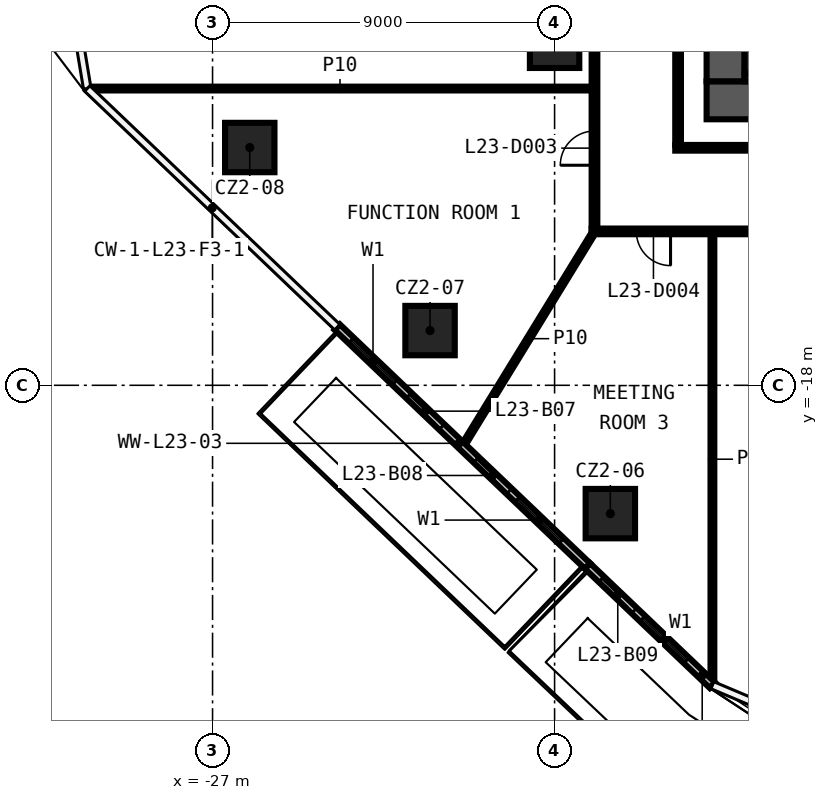
"""IFC4 building model, lengths in metres.
Left out: names, types, materials, properties, quantities, classifications, styles, units other than length and angle.
Written with IfcOpenShell. Run it as: python <this file> out.ifc"""

import sys

from ifc_helpers import new_model, si_unit, direction, frame, frame_2d, origin, origin_2d, place, context, subcontext, project, spatial, rectangle, extrude, element, fill, save


model = new_model("IFC4")
c1 = context("Model", 3, precision=1e-05, world=origin(), true_north=direction((0.0, 1.0)))
c2 = subcontext(c1, "Body", "Model", "MODEL_VIEW")
j1 = project(units=[si_unit("LENGTHUNIT", "METRE"), si_unit("PLANEANGLEUNIT", "RADIAN")], contexts=[c1])
p1 = place(None, origin())
s1 = spatial("IfcSite", under=j1, at=p1, CompositionType="ELEMENT")
p2 = place(p1, origin())
s2 = spatial("IfcBuilding", under=s1, at=p2, CompositionType="ELEMENT")
p3 = place(p2, frame((0.0, 0.0, 110.0)))
s3 = spatial("IfcBuildingStorey", under=s2, at=p3, CompositionType="ELEMENT", Elevation=110.0)
for number, where, z_axis, x_axis in (
    (1, (-16.533, -21.377, 0.0), (0.0, 0.0, 1.0), (1.0, 0.0, 0.0)),
    (2, (-21.277, -16.56, 0.0), (0.0, 0.0, 1.0), (1.0, 0.0, 0.0)),
    (3, (-26.021, -11.743, 0.0), (0.0, 0.0, 1.0), (1.0, 0.0, 0.0)),
    (4, (-18.0, -9.0, 0.0), (0.0, 0.0, 1.0), (1.0, 0.0, 0.0)),
):
    element("IfcColumn", number, at=place(p3, frame(where, z_axis=z_axis, x_axis=x_axis)), inside=s3, PredefinedType="COLUMN", context=c2, shape_type="SweptSolid", body=[
        extrude(rectangle(XDim=1.3, YDim=1.3, at=origin_2d()), origin(), (0.0, 0.0, 1.0), 3.3),
    ])
p4 = place(p3, frame((17.025, -13.95, 0.0), z_axis=(0.0, 0.0, 1.0), x_axis=(-1.0, 0.0, 0.0)))
e5 = element("IfcWall", 5, at=p4, inside=s3, PredefinedType="PARTITIONING", context=c2, shape_type="SweptSolid", body=[
    extrude(rectangle(XDim=34.05, YDim=0.15, at=frame_2d((17.025, 0.0))), origin(), (0.0, 0.0, 1.0), 3.3),
])
p5 = place(p4, frame((31.974, 0.0, 0.0)))
e6 = element("IfcOpeningElement", 6, at=p5, cuts=e5, PredefinedType="OPENING", context=c2, shape_type="SweptSolid", body=[
    extrude(rectangle(XDim=0.9, YDim=2.1, at=frame_2d((0.45, 1.05))), frame((0.0, 0.085, 0.0), z_axis=(0.0, -1.0, 0.0), x_axis=(1.0, 0.0, 0.0)), (0.0, 0.0, 1.0), 0.17),
])
p6 = place(p4, frame((27.543, 0.0, 0.0)))
e7 = element("IfcOpeningElement", 7, at=p6, cuts=e5, PredefinedType="OPENING", context=c2, shape_type="SweptSolid", body=[
    extrude(rectangle(XDim=1.0, YDim=2.1, at=frame_2d((0.5, 1.05))), frame((0.0, 0.085, 0.0), z_axis=(0.0, -1.0, 0.0), x_axis=(1.0, 0.0, 0.0)), (0.0, 0.0, 1.0), 0.17),
])
p7 = place(p4, frame((16.333, 0.0, 0.0)))
e8 = element("IfcOpeningElement", 8, at=p7, cuts=e5, PredefinedType="OPENING", context=c2, shape_type="SweptSolid", body=[
    extrude(rectangle(XDim=1.0, YDim=2.1, at=frame_2d((0.5, 1.05))), frame((0.0, 0.085, 0.0), z_axis=(0.0, -1.0, 0.0), x_axis=(1.0, 0.0, 0.0)), (0.0, 0.0, 1.0), 0.17),
])
p8 = place(p4, frame((12.006, 0.0, 0.0)))
e9 = element("IfcOpeningElement", 9, at=p8, cuts=e5, PredefinedType="OPENING", context=c2, shape_type="SweptSolid", body=[
    extrude(rectangle(XDim=1.0, YDim=2.1, at=frame_2d((0.5, 1.05))), frame((0.0, 0.085, 0.0), z_axis=(0.0, -1.0, 0.0), x_axis=(1.0, 0.0, 0.0)), (0.0, 0.0, 1.0), 0.17),
])
p9 = place(p4, frame((5.124, 0.0, 0.0)))
e10 = element("IfcOpeningElement", 10, at=p9, cuts=e5, PredefinedType="OPENING", context=c2, shape_type="SweptSolid", body=[
    extrude(rectangle(XDim=1.0, YDim=2.1, at=frame_2d((0.5, 1.05))), frame((0.0, 0.085, 0.0), z_axis=(0.0, -1.0, 0.0), x_axis=(1.0, 0.0, 0.0)), (0.0, 0.0, 1.0), 0.17),
])
p10 = place(p4, frame((3.144, 0.0, 0.0)))
e11 = element("IfcOpeningElement", 11, at=p10, cuts=e5, PredefinedType="OPENING", context=c2, shape_type="SweptSolid", body=[
    extrude(rectangle(XDim=1.0, YDim=2.1, at=frame_2d((0.5, 1.05))), frame((0.0, 0.085, 0.0), z_axis=(0.0, -1.0, 0.0), x_axis=(1.0, 0.0, 0.0)), (0.0, 0.0, 1.0), 0.17),
])
p11 = place(p3, frame((-14.825, -11.75, 0.0), z_axis=(0.0, 0.0, 1.0), x_axis=(1.0, 0.0, 0.0)))
e12 = element("IfcWall", 12, at=p11, inside=s3, PredefinedType="PARTITIONING", context=c2, shape_type="SweptSolid", body=[
    extrude(rectangle(XDim=22.025, YDim=0.15, at=frame_2d((11.012, 0.0))), origin(), (0.0, 0.0, 1.0), 3.3),
])
p12 = place(p3, frame((-30.268, -10.191, 0.0), z_axis=(0.0, 0.0, 1.0), x_axis=(1.0, 0.0, 0.0)))
e13 = element("IfcWall", 13, at=p12, inside=s3, PredefinedType="PARTITIONING", context=c2, shape_type="SweptSolid", body=[
    extrude(rectangle(XDim=13.243, YDim=0.1, at=frame_2d((6.622, 0.0))), origin(), (0.0, 0.0, 1.0), 3.3),
])
p13 = place(p3, frame((-20.415, -19.596, 0.0), z_axis=(0.0, 0.0, 1.0), x_axis=(0.5230874117, 0.85227903865, 0.0)))
e14 = element("IfcWall", 14, at=p13, inside=s3, PredefinedType="PARTITIONING", context=c2, shape_type="SweptSolid", body=[
    extrude(rectangle(XDim=6.624, YDim=0.1, at=frame_2d((3.312, 0.0))), origin(), (0.0, 0.0, 1.0), 3.3),
])
p14 = place(p3, frame((-13.847, -25.865, 0.0), z_axis=(0.0, 0.0, 1.0), x_axis=(0.0, 1.0, 0.0)))
e15 = element("IfcWall", 15, at=p14, inside=s3, PredefinedType="PARTITIONING", context=c2, shape_type="SweptSolid", body=[
    extrude(rectangle(XDim=11.84, YDim=0.1, at=frame_2d((5.92, 0.0))), origin(), (0.0, 0.0, 1.0), 3.3),
])
p15 = place(p3, frame((-14.75, 11.675, 0.0), z_axis=(0.0, 0.0, 1.0), x_axis=(0.0, -1.0, 0.0)))
e16 = element("IfcWall", 16, at=p15, inside=s3, PredefinedType="PARTITIONING", context=c2, shape_type="SweptSolid", body=[
    extrude(rectangle(XDim=23.35, YDim=0.15, at=frame_2d((11.675, 0.0))), origin(), (0.0, 0.0, 1.0), 3.3),
])
p16 = place(p15, frame((11.225, 0.0, 0.0)))
e17 = element("IfcOpeningElement", 17, at=p16, cuts=e16, PredefinedType="OPENING", context=c2, shape_type="SweptSolid", body=[
    extrude(rectangle(XDim=0.9, YDim=2.1, at=frame_2d((0.45, 1.05))), frame((0.0, 0.085, 0.0), z_axis=(0.0, -1.0, 0.0), x_axis=(1.0, 0.0, 0.0)), (0.0, 0.0, 1.0), 0.17),
])
p17 = place(p3, frame((-16.95, -13.875, 0.0), z_axis=(0.0, 0.0, 1.0), x_axis=(0.0, 1.0, 0.0)))
e18 = element("IfcWall", 18, at=p17, inside=s3, PredefinedType="PARTITIONING", context=c2, shape_type="SweptSolid", body=[
    extrude(rectangle(XDim=27.75, YDim=0.15, at=frame_2d((13.875, 0.0))), origin(), (0.0, 0.0, 1.0), 3.3),
])
p18 = place(p17, frame((11.06, 0.0, 0.0)))
e19 = element("IfcOpeningElement", 19, at=p18, cuts=e18, PredefinedType="OPENING", context=c2, shape_type="SweptSolid", body=[
    extrude(rectangle(XDim=0.9, YDim=2.1, at=frame_2d((0.45, 1.05))), frame((0.0, 0.085, 0.0), z_axis=(0.0, -1.0, 0.0), x_axis=(1.0, 0.0, 0.0)), (0.0, 0.0, 1.0), 0.17),
])
p19 = place(p17, frame((8.387, 0.0, 0.0)))
e20 = element("IfcOpeningElement", 20, at=p19, cuts=e18, PredefinedType="OPENING", context=c2, shape_type="SweptSolid", body=[
    extrude(rectangle(XDim=0.9, YDim=2.1, at=frame_2d((0.45, 1.05))), frame((0.0, 0.085, 0.0), z_axis=(0.0, -1.0, 0.0), x_axis=(1.0, 0.0, 0.0)), (0.0, 0.0, 1.0), 0.17),
])
p20 = place(p17, frame((1.666, 0.0, 0.0)))
e21 = element("IfcOpeningElement", 21, at=p20, cuts=e18, PredefinedType="OPENING", context=c2, shape_type="SweptSolid", body=[
    extrude(rectangle(XDim=0.9, YDim=2.1, at=frame_2d((0.45, 1.05))), frame((0.0, 0.085, 0.0), z_axis=(0.0, -1.0, 0.0), x_axis=(1.0, 0.0, 0.0)), (0.0, 0.0, 1.0), 0.17),
])
p21 = place(p17, frame((25.152, 0.0, 0.0)))
e22 = element("IfcOpeningElement", 22, at=p21, cuts=e18, PredefinedType="OPENING", context=c2, shape_type="SweptSolid", body=[
    extrude(rectangle(XDim=0.9, YDim=2.1, at=frame_2d((0.45, 1.05))), frame((0.0, 0.085, 0.0), z_axis=(0.0, -1.0, 0.0), x_axis=(1.0, 0.0, 0.0)), (0.0, 0.0, 1.0), 0.17),
])
p22 = place(p17, frame((18.782, 0.0, 0.0)))
e23 = element("IfcOpeningElement", 23, at=p22, cuts=e18, PredefinedType="OPENING", context=c2, shape_type="SweptSolid", body=[
    extrude(rectangle(XDim=1.0, YDim=2.1, at=frame_2d((0.5, 1.05))), frame((0.0, 0.085, 0.0), z_axis=(0.0, -1.0, 0.0), x_axis=(1.0, 0.0, 0.0)), (0.0, 0.0, 1.0), 0.17),
])
p23 = place(p17, frame((17.26, 0.0, 0.0)))
e24 = element("IfcOpeningElement", 24, at=p23, cuts=e18, PredefinedType="OPENING", context=c2, shape_type="SweptSolid", body=[
    extrude(rectangle(XDim=1.0, YDim=2.1, at=frame_2d((0.5, 1.05))), frame((0.0, 0.085, 0.0), z_axis=(0.0, -1.0, 0.0), x_axis=(1.0, 0.0, 0.0)), (0.0, 0.0, 1.0), 0.17),
])
p24 = place(p3, frame((-23.718, -16.471, 0.0), z_axis=(0.0, 0.0, 1.0), x_axis=(0.723342757747, -0.690489141706, 0.0)))
e25 = element("IfcWall", 25, at=p24, inside=s3, PredefinedType="SOLIDWALL", context=c2, shape_type="SweptSolid", body=[
    extrude(rectangle(XDim=9.103, YDim=0.2, at=frame_2d((4.552, 0.0))), origin(), (0.0, 0.0, 1.0), 3.3),
])
p25 = place(p24, frame((0.5, 0.0, 0.6)))
e26 = element("IfcOpeningElement", 26, at=p25, cuts=e25, PredefinedType="OPENING", context=c2, shape_type="SweptSolid", body=[
    extrude(rectangle(XDim=1.6, YDim=2.4, at=frame_2d((0.8, 1.2))), frame((0.0, 0.11, 0.0), z_axis=(0.0, -1.0, 0.0), x_axis=(1.0, 0.0, 0.0)), (0.0, 0.0, 1.0), 0.22),
])
p26 = place(p24, frame((2.6, 0.0, 0.0)))
e27 = element("IfcOpeningElement", 27, at=p26, cuts=e25, PredefinedType="OPENING", context=c2, shape_type="SweptSolid", body=[
    extrude(rectangle(XDim=1.2, YDim=2.4, at=frame_2d((0.6, 1.2))), frame((0.0, 0.11, 0.0), z_axis=(0.0, -1.0, 0.0), x_axis=(1.0, 0.0, 0.0)), (0.0, 0.0, 1.0), 0.22),
])
p27 = place(p24, frame((6.552, 0.0, 0.6)))
e28 = element("IfcOpeningElement", 28, at=p27, cuts=e25, PredefinedType="OPENING", context=c2, shape_type="SweptSolid", body=[
    extrude(rectangle(XDim=1.6, YDim=2.4, at=frame_2d((0.8, 1.2))), frame((0.0, 0.11, 0.0), z_axis=(0.0, -1.0, 0.0), x_axis=(1.0, 0.0, 0.0)), (0.0, 0.0, 1.0), 0.22),
])
p28 = place(p24, frame((5.052, 0.0, 0.0)))
e29 = element("IfcOpeningElement", 29, at=p28, cuts=e25, PredefinedType="OPENING", context=c2, shape_type="SweptSolid", body=[
    extrude(rectangle(XDim=1.2, YDim=2.4, at=frame_2d((0.6, 1.2))), frame((0.0, 0.11, 0.0), z_axis=(0.0, -1.0, 0.0), x_axis=(1.0, 0.0, 0.0)), (0.0, 0.0, 1.0), 0.22),
])
p29 = place(p3, frame((-17.133, -22.756, 0.0), z_axis=(0.0, 0.0, 1.0), x_axis=(0.723361644964, -0.69046935529, 0.0)))
e30 = element("IfcWall", 30, at=p29, inside=s3, PredefinedType="SOLIDWALL", context=c2, shape_type="SweptSolid", body=[
    extrude(rectangle(XDim=4.542, YDim=0.2, at=frame_2d((2.271, 0.0))), origin(), (0.0, 0.0, 1.0), 3.3),
])
p30 = place(p29, frame((2.0, 0.0, 0.6)))
e31 = element("IfcOpeningElement", 31, at=p30, cuts=e30, PredefinedType="OPENING", context=c2, shape_type="SweptSolid", body=[
    extrude(rectangle(XDim=1.6, YDim=2.4, at=frame_2d((0.8, 1.2))), frame((0.0, 0.11, 0.0), z_axis=(0.0, -1.0, 0.0), x_axis=(1.0, 0.0, 0.0)), (0.0, 0.0, 1.0), 0.22),
])
p31 = place(p29, frame((0.5, 0.0, 0.0)))
e32 = element("IfcOpeningElement", 32, at=p31, cuts=e30, PredefinedType="OPENING", context=c2, shape_type="SweptSolid", body=[
    extrude(rectangle(XDim=1.2, YDim=2.4, at=frame_2d((0.6, 1.2))), frame((0.0, 0.11, 0.0), z_axis=(0.0, -1.0, 0.0), x_axis=(1.0, 0.0, 0.0)), (0.0, 0.0, 1.0), 0.22),
])
p32 = place(p3, frame((14.0, -10.5, 0.0), z_axis=(0.0, 0.0, 1.0), x_axis=(-1.0, 0.0, 0.0)))
e33 = element("IfcWall", 33, at=p32, inside=s3, PredefinedType="SHEAR", context=c2, shape_type="SweptSolid", body=[
    extrude(rectangle(XDim=28.0, YDim=1.0, at=frame_2d((14.0, 0.0))), origin(), (0.0, 0.0, 1.0), 3.3),
])
p33 = place(p32, frame((5.1, 0.0, 0.0)))
e34 = element("IfcOpeningElement", 34, at=p33, cuts=e33, PredefinedType="OPENING", context=c2, shape_type="SweptSolid", body=[
    extrude(rectangle(XDim=1.6, YDim=2.1, at=frame_2d((0.8, 1.05))), frame((0.0, 0.51, 0.0), z_axis=(0.0, -1.0, 0.0), x_axis=(1.0, 0.0, 0.0)), (0.0, 0.0, 1.0), 1.02),
])
p34 = place(p3, frame((-13.5, -10.0, 0.0), z_axis=(0.0, 0.0, 1.0), x_axis=(0.0, 1.0, 0.0)))
e35 = element("IfcWall", 35, at=p34, inside=s3, PredefinedType="SHEAR", context=c2, shape_type="SweptSolid", body=[
    extrude(rectangle(XDim=20.0, YDim=1.0, at=frame_2d((10.0, 0.0))), origin(), (0.0, 0.0, 1.0), 3.3),
])
p35 = place(p3, frame((6.9, -9.9, 0.0), z_axis=(0.0, 0.0, 1.0), x_axis=(-1.0, 0.0, 0.0)))
e36 = element("IfcWall", 36, at=p35, inside=s3, PredefinedType="SHEAR", context=c2, shape_type="SweptSolid", body=[
    extrude(rectangle(XDim=19.9, YDim=0.2, at=frame_2d((9.95, 0.0))), origin(), (0.0, 0.0, 1.0), 3.3),
])
p36 = place(p3, frame((-12.9, -9.8, 0.0), z_axis=(0.0, 0.0, 1.0), x_axis=(0.0, 1.0, 0.0)))
e37 = element("IfcWall", 37, at=p36, inside=s3, PredefinedType="SHEAR", context=c2, shape_type="SweptSolid", body=[
    extrude(rectangle(XDim=19.6, YDim=0.2, at=frame_2d((9.8, 0.0))), origin(), (0.0, 0.0, 1.0), 3.3),
])
p37 = place(p20, origin())
e38 = element("IfcDoor", 38, at=p37, inside=s3, OperationType="SINGLE_SWING_LEFT", PredefinedType="DOOR", context=c2, shape_type="SweptSolid", body=[
    extrude(rectangle(XDim=0.9, YDim=2.1, at=frame_2d((0.45, 1.05))), frame((0.0, 0.025, 0.0), z_axis=(0.0, -1.0, 0.0), x_axis=(1.0, 0.0, 0.0)), (0.0, 0.0, 1.0), 0.05),
])
fill(e21, e38)
p38 = place(p5, origin())
e39 = element("IfcDoor", 39, at=p38, inside=s3, OperationType="SINGLE_SWING_RIGHT", PredefinedType="DOOR", context=c2, shape_type="SweptSolid", body=[
    extrude(rectangle(XDim=0.9, YDim=2.1, at=frame_2d((0.45, 1.05))), frame((0.0, 0.025, 0.0), z_axis=(0.0, -1.0, 0.0), x_axis=(1.0, 0.0, 0.0)), (0.0, 0.0, 1.0), 0.05),
])
fill(e6, e39)
p39 = place(p25, origin())
e40 = element("IfcWindow", 40, at=p39, inside=s3, PartitioningType="SINGLE_PANEL", PredefinedType="WINDOW", context=c2, shape_type="SweptSolid", body=[
    extrude(rectangle(XDim=1.6, YDim=2.4, at=frame_2d((0.8, 1.2))), frame((0.0, 0.03, 0.0), z_axis=(0.0, -1.0, 0.0), x_axis=(1.0, 0.0, 0.0)), (0.0, 0.0, 1.0), 0.06),
])
fill(e26, e40)
p40 = place(p26, origin())
e41 = element("IfcDoor", 41, at=p40, inside=s3, OperationType="SLIDING_TO_LEFT", PredefinedType="DOOR", context=c2, shape_type="SweptSolid", body=[
    extrude(rectangle(XDim=1.2, YDim=2.4, at=frame_2d((0.6, 1.2))), frame((0.0, 0.025, 0.0), z_axis=(0.0, -1.0, 0.0), x_axis=(1.0, 0.0, 0.0)), (0.0, 0.0, 1.0), 0.05),
])
fill(e27, e41)
p41 = place(p27, origin())
e42 = element("IfcWindow", 42, at=p41, inside=s3, PartitioningType="SINGLE_PANEL", PredefinedType="WINDOW", context=c2, shape_type="SweptSolid", body=[
    extrude(rectangle(XDim=1.6, YDim=2.4, at=frame_2d((0.8, 1.2))), frame((0.0, 0.03, 0.0), z_axis=(0.0, -1.0, 0.0), x_axis=(1.0, 0.0, 0.0)), (0.0, 0.0, 1.0), 0.06),
])
fill(e28, e42)
p42 = place(p28, origin())
e43 = element("IfcDoor", 43, at=p42, inside=s3, OperationType="SLIDING_TO_LEFT", PredefinedType="DOOR", context=c2, shape_type="SweptSolid", body=[
    extrude(rectangle(XDim=1.2, YDim=2.4, at=frame_2d((0.6, 1.2))), frame((0.0, 0.025, 0.0), z_axis=(0.0, -1.0, 0.0), x_axis=(1.0, 0.0, 0.0)), (0.0, 0.0, 1.0), 0.05),
])
fill(e29, e43)
p43 = place(p30, origin())
e44 = element("IfcWindow", 44, at=p43, inside=s3, PartitioningType="SINGLE_PANEL", PredefinedType="WINDOW", context=c2, shape_type="SweptSolid", body=[
    extrude(rectangle(XDim=1.6, YDim=2.4, at=frame_2d((0.8, 1.2))), frame((0.0, 0.03, 0.0), z_axis=(0.0, -1.0, 0.0), x_axis=(1.0, 0.0, 0.0)), (0.0, 0.0, 1.0), 0.06),
])
fill(e31, e44)
p44 = place(p31, origin())
e45 = element("IfcDoor", 45, at=p44, inside=s3, OperationType="SLIDING_TO_LEFT", PredefinedType="DOOR", context=c2, shape_type="SweptSolid", body=[
    extrude(rectangle(XDim=1.2, YDim=2.4, at=frame_2d((0.6, 1.2))), frame((0.0, 0.025, 0.0), z_axis=(0.0, -1.0, 0.0), x_axis=(1.0, 0.0, 0.0)), (0.0, 0.0, 1.0), 0.05),
])
fill(e32, e45)
save(model, sys.argv[1])
